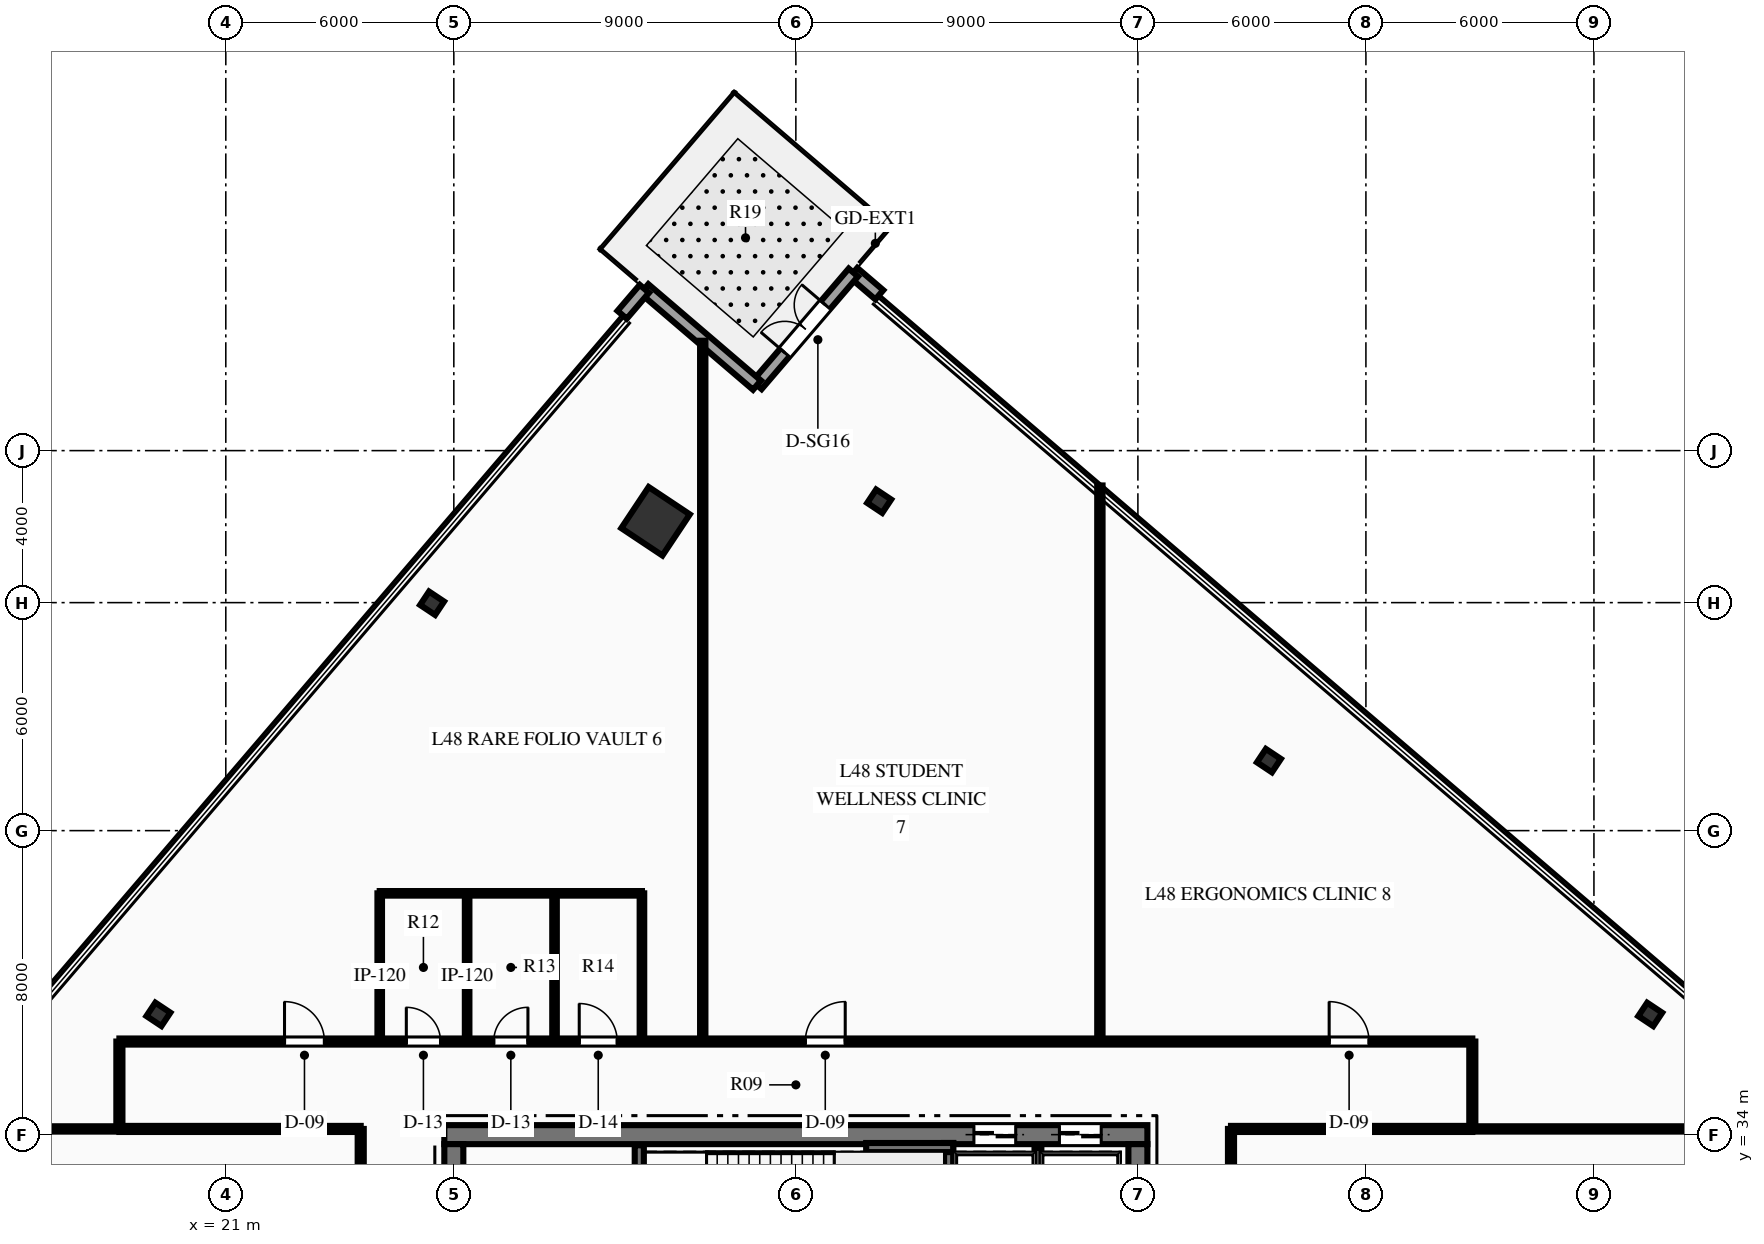
"""IFC4 building model, lengths in metres.
Left out: names, types, materials, properties, quantities, classifications, styles, units other than length and angle.
Written with IfcOpenShell. Run it as: python <this file> out.ifc"""

import sys

from ifc_helpers import new_model, si_unit, direction, frame, frame_2d, origin, origin_2d, place, context, subcontext, project, spatial, rectangle, hollow_rectangle, i_section, extrude, element, fill, save


model = new_model("IFC4")
c1 = context("Model", 3, precision=1e-05, world=origin(), true_north=direction((0.0, 1.0)))
c2 = subcontext(c1, "Body", "Model", "MODEL_VIEW")
j1 = project(units=[si_unit("LENGTHUNIT", "METRE"), si_unit("PLANEANGLEUNIT", "RADIAN")], contexts=[c1])
p1 = place(None, origin())
s1 = spatial("IfcSite", under=j1, at=p1, CompositionType="ELEMENT")
p2 = place(p1, origin())
s2 = spatial("IfcBuilding", under=s1, at=p2, CompositionType="ELEMENT")
p3 = place(p2, frame((0.0, 0.0, 193.95)))
s3 = spatial("IfcBuildingStorey", under=s2, at=p3, CompositionType="ELEMENT", Elevation=193.95)
p4 = place(p3, frame((26.75, 34.0, 0.0), z_axis=(0.0, 0.0, 1.0), x_axis=(1.0, 0.0, 0.0)))
e1 = element("IfcWall", 1, at=p4, inside=s3, PredefinedType="SHEAR", context=c2, shape_type="SweptSolid", body=[
    extrude(rectangle(XDim=18.5, YDim=0.5, at=frame_2d((9.25, 0.0))), origin(), (0.0, 0.0, 1.0), 4.5),
])
p5 = place(p4, frame((13.935, 0.0, 0.0)))
e2 = element("IfcOpeningElement", 2, at=p5, cuts=e1, PredefinedType="OPENING", context=c2, shape_type="SweptSolid", body=[
    extrude(rectangle(XDim=1.1, YDim=2.15, at=frame_2d((0.55, 1.075))), frame((0.0, 0.26, 0.0), z_axis=(0.0, -1.0, 0.0), x_axis=(1.0, 0.0, 0.0)), (0.0, 0.0, 1.0), 0.52),
])
p6 = place(p4, frame((16.185, 0.0, 0.0)))
e3 = element("IfcOpeningElement", 3, at=p6, cuts=e1, PredefinedType="OPENING", context=c2, shape_type="SweptSolid", body=[
    extrude(rectangle(XDim=1.1, YDim=2.15, at=frame_2d((0.55, 1.075))), frame((0.0, 0.26, 0.0), z_axis=(0.0, -1.0, 0.0), x_axis=(1.0, 0.0, 0.0)), (0.0, 0.0, 1.0), 0.52),
])
p7 = place(p3, frame((27.0, 18.25, 0.0), z_axis=(0.0, 0.0, 1.0), x_axis=(0.0, 1.0, 0.0)))
e4 = element("IfcWall", 4, at=p7, inside=s3, PredefinedType="SHEAR", context=c2, shape_type="SweptSolid", body=[
    extrude(rectangle(XDim=15.5, YDim=0.5, at=frame_2d((7.75, 0.0))), origin(), (0.0, 0.0, 1.0), 4.5),
])
p8 = place(p7, frame((9.99, 0.0, 0.0)))
e5 = element("IfcOpeningElement", 5, at=p8, cuts=e4, PredefinedType="OPENING", context=c2, shape_type="SweptSolid", body=[
    extrude(rectangle(XDim=1.4, YDim=2.2, at=frame_2d((0.7, 1.1))), frame((0.0, 0.26, 0.0), z_axis=(0.0, -1.0, 0.0), x_axis=(1.0, 0.0, 0.0)), (0.0, 0.0, 1.0), 0.52),
])
p9 = place(p3, frame((45.0, 18.25, 0.0), z_axis=(0.0, 0.0, 1.0), x_axis=(0.0, 1.0, 0.0)))
e6 = element("IfcWall", 6, at=p9, inside=s3, PredefinedType="SHEAR", context=c2, shape_type="SweptSolid", body=[
    extrude(rectangle(XDim=15.5, YDim=0.5, at=frame_2d((7.75, 0.0))), origin(), (0.0, 0.0, 1.0), 4.5),
])
p10 = place(p9, frame((9.99, 0.0, 0.0)))
e7 = element("IfcOpeningElement", 7, at=p10, cuts=e6, PredefinedType="OPENING", context=c2, shape_type="SweptSolid", body=[
    extrude(rectangle(XDim=1.4, YDim=2.2, at=frame_2d((0.7, 1.1))), frame((0.0, 0.26, 0.0), z_axis=(0.0, -1.0, 0.0), x_axis=(1.0, 0.0, 0.0)), (0.0, 0.0, 1.0), 0.52),
])
p11 = place(p3, frame((31.88, 29.93, 0.0), z_axis=(0.0, 0.0, 1.0), x_axis=(0.0, 1.0, 0.0)))
e8 = element("IfcWall", 8, at=p11, inside=s3, PredefinedType="SHEAR", context=c2, shape_type="SweptSolid", body=[
    extrude(rectangle(XDim=3.79, YDim=0.24, at=frame_2d((1.895, 0.0))), origin(), (0.0, 0.0, 1.0), 4.5),
])
p12 = place(p3, frame((40.02, 29.93, 0.0), z_axis=(0.0, 0.0, 1.0), x_axis=(0.0, 1.0, 0.0)))
e9 = element("IfcWall", 9, at=p12, inside=s3, PredefinedType="SHEAR", context=c2, shape_type="SweptSolid", body=[
    extrude(rectangle(XDim=3.85, YDim=0.24, at=frame_2d((1.925, 0.0))), origin(), (0.0, 0.0, 1.0), 4.5),
])
p13 = place(p3, frame((37.85, 33.66, 0.0), z_axis=(0.0, 0.0, 1.0), x_axis=(1.0, 0.0, 0.0)))
e10 = element("IfcWall", 10, at=p13, inside=s3, PredefinedType="SHEAR", context=c2, shape_type="SweptSolid", body=[
    extrude(rectangle(XDim=2.29, YDim=0.24, at=frame_2d((1.145, 0.0))), origin(), (0.0, 0.0, 1.0), 4.5),
])
p14 = place(p3, frame((32.308, 50.141, 0.0), z_axis=(0.0, 0.0, 1.0), x_axis=(0.554118199338, 0.832437998389, 0.0)))
e11 = element("IfcColumn", 11, at=p14, inside=s3, PredefinedType="COLUMN", context=c2, shape_type="SweptSolid", body=[
    extrude(hollow_rectangle(XDim=1.3, YDim=1.3, WallThickness=0.06, at=origin_2d()), origin(), (0.0, 0.0, 1.0), 4.5),
])
for number, where, z_axis, x_axis in (
    (12, (58.481, 37.164, 0.0), (0.0, 0.0, 1.0), (0.554, 0.832, 0.0)),
    (13, (48.448, 43.842, 0.0), (0.0, 0.0, 1.0), (0.554, 0.832, 0.0)),
    (14, (38.193, 50.668, 0.0), (0.0, 0.0, 1.0), (0.554, 0.832, 0.0)),
    (15, (26.428, 47.984, 0.0), (0.0, 0.0, 1.0), (0.554, 0.832, 0.0)),
    (16, (19.226, 37.166, 0.0), (0.0, 0.0, 1.0), (0.554, 0.832, 0.0)),
):
    element("IfcColumn", number, at=place(p3, frame(where, z_axis=z_axis, x_axis=x_axis)), inside=s3, PredefinedType="COLUMN", context=c2, shape_type="SweptSolid", body=[
        extrude(i_section(OverallWidth=0.424, OverallDepth=0.474, WebThickness=0.048, FlangeThickness=0.077, at=origin_2d()), origin(), (0.0, 0.0, 1.0), 4.5),
    ])
p15 = place(p3, frame((37.513, 56.686, 0.0), z_axis=(0.0, 0.0, 1.0), x_axis=(0.759773334815, -0.650188034113, 0.0)))
e17 = element("IfcWall", 17, at=p15, inside=s3, PredefinedType="STANDARD", context=c2, shape_type="SweptSolid", body=[
    extrude(rectangle(XDim=0.9, YDim=0.32, at=frame_2d((0.45, 0.0))), origin(), (0.0, 0.0, 1.0), 4.22),
])
p16 = place(p3, frame((34.977, 53.723, 0.0), z_axis=(0.0, 0.0, 1.0), x_axis=(0.650105449276, 0.759844000319, 0.0)))
e18 = element("IfcWall", 18, at=p16, inside=s3, PredefinedType="STANDARD", context=c2, shape_type="SweptSolid", body=[
    extrude(rectangle(XDim=3.9, YDim=0.32, at=frame_2d((1.95, 0.0))), origin(), (0.0, 0.0, 1.0), 4.22),
])
p17 = place(p16, frame((1.125, 0.0, 0.0)))
e19 = element("IfcOpeningElement", 19, at=p17, cuts=e18, PredefinedType="OPENING", context=c2, shape_type="SweptSolid", body=[
    extrude(rectangle(XDim=1.65, YDim=2.35, at=frame_2d((0.825, 1.175))), frame((0.0, 0.17, 0.0), z_axis=(0.0, -1.0, 0.0), x_axis=(1.0, 0.0, 0.0)), (0.0, 0.0, 1.0), 0.34),
])
p18 = place(p3, frame((32.014, 56.258, 0.0), z_axis=(0.0, 0.0, 1.0), x_axis=(0.759844000319, -0.650105449276, 0.0)))
e20 = element("IfcWall", 20, at=p18, inside=s3, PredefinedType="STANDARD", context=c2, shape_type="SweptSolid", body=[
    extrude(rectangle(XDim=3.9, YDim=0.32, at=frame_2d((1.95, 0.0))), origin(), (0.0, 0.0, 1.0), 4.22),
])
p19 = place(p3, frame((31.429, 55.574, 0.0), z_axis=(0.0, 0.0, 1.0), x_axis=(0.650054054962, 0.759887969129, 0.0)))
e21 = element("IfcWall", 21, at=p19, inside=s3, PredefinedType="STANDARD", context=c2, shape_type="SweptSolid", body=[
    extrude(rectangle(XDim=0.9, YDim=0.32, at=frame_2d((0.45, 0.0))), origin(), (0.0, 0.0, 1.0), 4.22),
])
p20 = place(p3, frame((42.37, 29.9, 0.0), z_axis=(0.0, 0.0, 1.0), x_axis=(0.0, 1.0, 0.0)))
e22 = element("IfcWall", 22, at=p20, inside=s3, PredefinedType="PARTITIONING", context=c2, shape_type="SweptSolid", body=[
    extrude(rectangle(XDim=3.75, YDim=0.18, at=frame_2d((1.875, 0.0))), origin(), (0.0, 0.0, 1.0), 4.22),
])
p21 = place(p3, frame((18.2, 36.45, 0.0), z_axis=(0.0, 0.0, 1.0), x_axis=(1.0, 0.0, 0.0)))
e23 = element("IfcWall", 23, at=p21, inside=s3, PredefinedType="PARTITIONING", context=c2, shape_type="SweptSolid", body=[
    extrude(rectangle(XDim=35.6, YDim=0.16, at=frame_2d((17.8, 0.0))), origin(), (0.0, 0.0, 1.0), 3.599),
])
p22 = place(p21, frame((7.55, 0.0, 0.0)))
e24 = element("IfcOpeningElement", 24, at=p22, cuts=e23, PredefinedType="OPENING", context=c2, shape_type="SweptSolid", body=[
    extrude(rectangle(XDim=0.9, YDim=2.15, at=frame_2d((0.45, 1.075))), frame((0.0, 0.09, 0.0), z_axis=(0.0, -1.0, 0.0), x_axis=(1.0, 0.0, 0.0)), (0.0, 0.0, 1.0), 0.18),
])
p23 = place(p21, frame((9.85, 0.0, 0.0)))
e25 = element("IfcOpeningElement", 25, at=p23, cuts=e23, PredefinedType="OPENING", context=c2, shape_type="SweptSolid", body=[
    extrude(rectangle(XDim=0.9, YDim=2.15, at=frame_2d((0.45, 1.075))), frame((0.0, 0.09, 0.0), z_axis=(0.0, -1.0, 0.0), x_axis=(1.0, 0.0, 0.0)), (0.0, 0.0, 1.0), 0.18),
])
p24 = place(p21, frame((12.1, 0.0, 0.0)))
e26 = element("IfcOpeningElement", 26, at=p24, cuts=e23, PredefinedType="OPENING", context=c2, shape_type="SweptSolid", body=[
    extrude(rectangle(XDim=1.0, YDim=2.15, at=frame_2d((0.5, 1.075))), frame((0.0, 0.09, 0.0), z_axis=(0.0, -1.0, 0.0), x_axis=(1.0, 0.0, 0.0)), (0.0, 0.0, 1.0), 0.18),
])
p25 = place(p21, frame((4.345, 0.0, 0.0)))
e27 = element("IfcOpeningElement", 27, at=p25, cuts=e23, PredefinedType="OPENING", context=c2, shape_type="SweptSolid", body=[
    extrude(rectangle(XDim=1.05, YDim=2.15, at=frame_2d((0.525, 1.075))), frame((0.0, 0.09, 0.0), z_axis=(0.0, -1.0, 0.0), x_axis=(1.0, 0.0, 0.0)), (0.0, 0.0, 1.0), 0.18),
])
p26 = place(p21, frame((18.049, 0.0, 0.0)))
e28 = element("IfcOpeningElement", 28, at=p26, cuts=e23, PredefinedType="OPENING", context=c2, shape_type="SweptSolid", body=[
    extrude(rectangle(XDim=1.05, YDim=2.15, at=frame_2d((0.525, 1.075))), frame((0.0, 0.09, 0.0), z_axis=(0.0, -1.0, 0.0), x_axis=(1.0, 0.0, 0.0)), (0.0, 0.0, 1.0), 0.18),
])
p27 = place(p21, frame((31.833, 0.0, 0.0)))
e29 = element("IfcOpeningElement", 29, at=p27, cuts=e23, PredefinedType="OPENING", context=c2, shape_type="SweptSolid", body=[
    extrude(rectangle(XDim=1.05, YDim=2.15, at=frame_2d((0.525, 1.075))), frame((0.0, 0.09, 0.0), z_axis=(0.0, -1.0, 0.0), x_axis=(1.0, 0.0, 0.0)), (0.0, 0.0, 1.0), 0.18),
])
for number, where, z_axis, x_axis in (
    (30, (18.2, 34.15, 0.0), (0.0, 0.0, 1.0), (1.0, 0.0, 0.0)),
    (31, (47.45, 34.15, 0.0), (0.0, 0.0, 1.0), (1.0, 0.0, 0.0)),
):
    element("IfcWall", number, at=place(p3, frame(where, z_axis=z_axis, x_axis=x_axis)), inside=s3, PredefinedType="PARTITIONING", context=c2, shape_type="SweptSolid", body=[
        extrude(rectangle(XDim=6.35, YDim=0.16, at=frame_2d((3.175, 0.0))), origin(), (0.0, 0.0, 1.0), 4.22),
    ])
p28 = place(p3, frame((24.55, 17.85, 0.0), z_axis=(0.0, 0.0, 1.0), x_axis=(0.0, 1.0, 0.0)))
e32 = element("IfcWall", 32, at=p28, inside=s3, PredefinedType="PARTITIONING", context=c2, shape_type="SweptSolid", body=[
    extrude(rectangle(XDim=16.3, YDim=0.16, at=frame_2d((8.15, 0.0))), origin(), (0.0, 0.0, 1.0), 4.22),
])
p29 = place(p28, frame((2.775, 0.0, 0.0)))
e33 = element("IfcOpeningElement", 33, at=p29, cuts=e32, PredefinedType="OPENING", context=c2, shape_type="SweptSolid", body=[
    extrude(rectangle(XDim=0.95, YDim=2.15, at=frame_2d((0.475, 1.075))), frame((0.0, 0.09, 0.0), z_axis=(0.0, -1.0, 0.0), x_axis=(1.0, 0.0, 0.0)), (0.0, 0.0, 1.0), 0.18),
])
p30 = place(p28, frame((8.729, 0.0, 0.0)))
e34 = element("IfcOpeningElement", 34, at=p30, cuts=e32, PredefinedType="OPENING", context=c2, shape_type="SweptSolid", body=[
    extrude(rectangle(XDim=1.05, YDim=2.15, at=frame_2d((0.525, 1.075))), frame((0.0, 0.09, 0.0), z_axis=(0.0, -1.0, 0.0), x_axis=(1.0, 0.0, 0.0)), (0.0, 0.0, 1.0), 0.18),
])
p31 = place(p3, frame((47.45, 27.25, 0.0), z_axis=(0.0, 0.0, 1.0), x_axis=(0.0, 1.0, 0.0)))
e35 = element("IfcWall", 35, at=p31, inside=s3, PredefinedType="PARTITIONING", context=c2, shape_type="SweptSolid", body=[
    extrude(rectangle(XDim=6.9, YDim=0.16, at=frame_2d((3.45, 0.0))), origin(), (0.0, 0.0, 1.0), 4.22),
])
p32 = place(p31, frame((1.683, 0.0, 0.0)))
e36 = element("IfcOpeningElement", 36, at=p32, cuts=e35, PredefinedType="OPENING", context=c2, shape_type="SweptSolid", body=[
    extrude(rectangle(XDim=1.05, YDim=2.15, at=frame_2d((0.525, 1.075))), frame((0.0, 0.09, 0.0), z_axis=(0.0, -1.0, 0.0), x_axis=(1.0, 0.0, 0.0)), (0.0, 0.0, 1.0), 0.18),
])
for number, where, z_axis, x_axis in (
    (37, (18.2, 34.15, 0.0), (0.0, 0.0, 1.0), (0.0, 1.0, 0.0)),
    (38, (53.8, 34.15, 0.0), (0.0, 0.0, 1.0), (0.0, 1.0, 0.0)),
):
    element("IfcWall", number, at=place(p3, frame(where, z_axis=z_axis, x_axis=x_axis)), inside=s3, PredefinedType="PARTITIONING", context=c2, shape_type="SweptSolid", body=[
        extrude(rectangle(XDim=2.3, YDim=0.16, at=frame_2d((1.15, 0.0))), origin(), (0.0, 0.0, 1.0), 4.22),
    ])
for number, where, z_axis, x_axis in (
    (39, (25.05, 36.45, 0.0), (0.0, 0.0, 1.0), (0.0, 1.0, 0.0)),
    (40, (27.35, 36.45, 0.0), (0.0, 0.0, 1.0), (0.0, 1.0, 0.0)),
    (41, (29.65, 36.45, 0.0), (0.0, 0.0, 1.0), (0.0, 1.0, 0.0)),
):
    element("IfcWall", number, at=place(p3, frame(where, z_axis=z_axis, x_axis=x_axis)), inside=s3, PredefinedType="PARTITIONING", context=c2, shape_type="SweptSolid", body=[
        extrude(rectangle(XDim=3.9, YDim=0.12, at=frame_2d((1.95, 0.0))), origin(), (0.0, 0.0, 1.0), 4.22),
    ])
p33 = place(p3, frame((31.95, 36.45, 0.0), z_axis=(0.0, 0.0, 1.0), x_axis=(0.0, 1.0, 0.0)))
e42 = element("IfcWall", 42, at=p33, inside=s3, PredefinedType="PARTITIONING", context=c2, shape_type="SweptSolid", body=[
    extrude(rectangle(XDim=3.9, YDim=0.12, at=frame_2d((1.95, 0.0))), origin(), (0.0, 0.0, 1.0), 3.599),
])
p34 = place(p3, frame((25.05, 40.35, 0.0), z_axis=(0.0, 0.0, 1.0), x_axis=(1.0, 0.0, 0.0)))
e43 = element("IfcWall", 43, at=p34, inside=s3, PredefinedType="PARTITIONING", context=c2, shape_type="SweptSolid", body=[
    extrude(rectangle(XDim=6.9, YDim=0.12, at=frame_2d((3.45, 0.0))), origin(), (0.0, 0.0, 1.0), 4.22),
])
p35 = place(p3, frame((13.151, 34.15, 0.0), z_axis=(0.0, 0.0, 1.0), x_axis=(1.0, 0.0, 0.0)))
e44 = element("IfcWall", 44, at=p35, inside=s3, PredefinedType="PARTITIONING", context=c2, shape_type="SweptSolid", body=[
    extrude(rectangle(XDim=5.049, YDim=0.14, at=frame_2d((2.524, 0.0))), origin(), (0.0, 0.0, 1.0), 4.22),
])
p36 = place(p3, frame((53.8, 34.15, 0.0), z_axis=(0.0, 0.0, 1.0), x_axis=(1.0, 0.0, 0.0)))
e45 = element("IfcWall", 45, at=p36, inside=s3, PredefinedType="PARTITIONING", context=c2, shape_type="SweptSolid", body=[
    extrude(rectangle(XDim=9.991, YDim=0.14, at=frame_2d((4.996, 0.0))), origin(), (0.0, 0.0, 1.0), 4.22),
])
p37 = place(p3, frame((33.55, 36.45, 0.0), z_axis=(0.0, 0.0, 1.0), x_axis=(0.0, 1.0, 0.0)))
e46 = element("IfcWall", 46, at=p37, inside=s3, PredefinedType="PARTITIONING", context=c2, shape_type="SweptSolid", body=[
    extrude(rectangle(XDim=18.441, YDim=0.14, at=frame_2d((9.221, 0.0))), origin(), (0.0, 0.0, 1.0), 4.22),
])
p38 = place(p3, frame((44.0, 36.45, 0.0), z_axis=(0.0, 0.0, 1.0), x_axis=(0.0, 1.0, 0.0)))
e47 = element("IfcWall", 47, at=p38, inside=s3, PredefinedType="PARTITIONING", context=c2, shape_type="SweptSolid", body=[
    extrude(rectangle(XDim=14.633, YDim=0.14, at=frame_2d((7.316, 0.0))), origin(), (0.0, 0.0, 1.0), 4.22),
])
p39 = place(p17, origin())
e48 = element("IfcDoor", 48, at=p39, inside=s3, OperationType="DOUBLE_DOOR_SINGLE_SWING", PredefinedType="DOOR", context=c2, shape_type="SweptSolid", body=[
    extrude(rectangle(XDim=1.65, YDim=2.35, at=frame_2d((0.825, 1.175))), frame((0.0, 0.025, 0.0), z_axis=(0.0, -1.0, 0.0), x_axis=(1.0, 0.0, 0.0)), (0.0, 0.0, 1.0), 0.05),
])
fill(e19, e48)
p40 = place(p22, origin())
e49 = element("IfcDoor", 49, at=p40, inside=s3, OperationType="SINGLE_SWING_LEFT", PredefinedType="DOOR", context=c2, shape_type="SweptSolid", body=[
    extrude(rectangle(XDim=0.9, YDim=2.15, at=frame_2d((0.45, 1.075))), frame((0.0, 0.025, 0.0), z_axis=(0.0, -1.0, 0.0), x_axis=(1.0, 0.0, 0.0)), (0.0, 0.0, 1.0), 0.05),
])
fill(e24, e49)
p41 = place(p23, origin())
e50 = element("IfcDoor", 50, at=p41, inside=s3, OperationType="SINGLE_SWING_RIGHT", PredefinedType="DOOR", context=c2, shape_type="SweptSolid", body=[
    extrude(rectangle(XDim=0.9, YDim=2.15, at=frame_2d((0.45, 1.075))), frame((0.0, 0.025, 0.0), z_axis=(0.0, -1.0, 0.0), x_axis=(1.0, 0.0, 0.0)), (0.0, 0.0, 1.0), 0.05),
])
fill(e25, e50)
p42 = place(p24, origin())
e51 = element("IfcDoor", 51, at=p42, inside=s3, OperationType="SINGLE_SWING_LEFT", PredefinedType="DOOR", context=c2, shape_type="SweptSolid", body=[
    extrude(rectangle(XDim=1.0, YDim=2.15, at=frame_2d((0.5, 1.075))), frame((0.0, 0.025, 0.0), z_axis=(0.0, -1.0, 0.0), x_axis=(1.0, 0.0, 0.0)), (0.0, 0.0, 1.0), 0.05),
])
fill(e26, e51)
p43 = place(p25, origin())
e52 = element("IfcDoor", 52, at=p43, inside=s3, OperationType="SINGLE_SWING_LEFT", PredefinedType="DOOR", context=c2, shape_type="SweptSolid", body=[
    extrude(rectangle(XDim=1.05, YDim=2.15, at=frame_2d((0.525, 1.075))), frame((0.0, 0.025, 0.0), z_axis=(0.0, -1.0, 0.0), x_axis=(1.0, 0.0, 0.0)), (0.0, 0.0, 1.0), 0.05),
])
fill(e27, e52)
p44 = place(p26, origin())
e53 = element("IfcDoor", 53, at=p44, inside=s3, OperationType="SINGLE_SWING_RIGHT", PredefinedType="DOOR", context=c2, shape_type="SweptSolid", body=[
    extrude(rectangle(XDim=1.05, YDim=2.15, at=frame_2d((0.525, 1.075))), frame((0.0, 0.025, 0.0), z_axis=(0.0, -1.0, 0.0), x_axis=(1.0, 0.0, 0.0)), (0.0, 0.0, 1.0), 0.05),
])
fill(e28, e53)
p45 = place(p27, origin())
e54 = element("IfcDoor", 54, at=p45, inside=s3, OperationType="SINGLE_SWING_LEFT", PredefinedType="DOOR", context=c2, shape_type="SweptSolid", body=[
    extrude(rectangle(XDim=1.05, YDim=2.15, at=frame_2d((0.525, 1.075))), frame((0.0, 0.025, 0.0), z_axis=(0.0, -1.0, 0.0), x_axis=(1.0, 0.0, 0.0)), (0.0, 0.0, 1.0), 0.05),
])
fill(e29, e54)
p46 = place(p5, origin())
e55 = element("IfcDoor", 55, at=p46, inside=s3, OperationType="SLIDING_TO_LEFT", PredefinedType="DOOR", context=c2, shape_type="SweptSolid", body=[
    extrude(rectangle(XDim=1.1, YDim=2.15, at=frame_2d((0.55, 1.075))), frame((0.0, 0.025, 0.0), z_axis=(0.0, -1.0, 0.0), x_axis=(1.0, 0.0, 0.0)), (0.0, 0.0, 1.0), 0.05),
])
fill(e2, e55)
p47 = place(p6, origin())
e56 = element("IfcDoor", 56, at=p47, inside=s3, OperationType="SLIDING_TO_LEFT", PredefinedType="DOOR", context=c2, shape_type="SweptSolid", body=[
    extrude(rectangle(XDim=1.1, YDim=2.15, at=frame_2d((0.55, 1.075))), frame((0.0, 0.025, 0.0), z_axis=(0.0, -1.0, 0.0), x_axis=(1.0, 0.0, 0.0)), (0.0, 0.0, 1.0), 0.05),
])
fill(e3, e56)
save(model, sys.argv[1])
